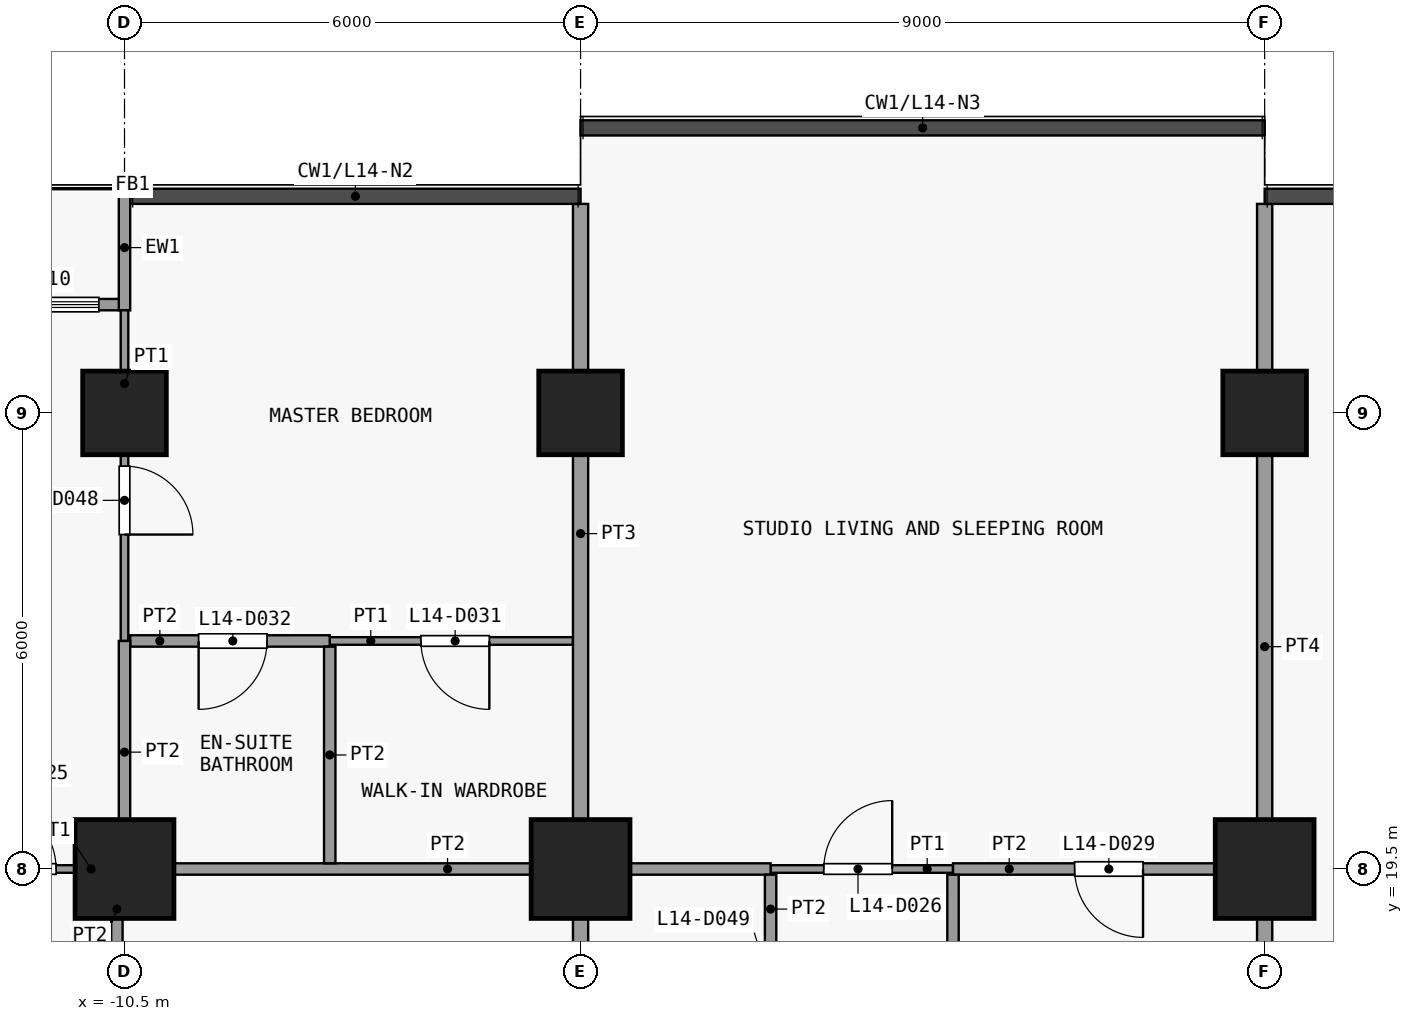
"""IFC4 building model, lengths in metres.
Left out: names, types, materials, properties, quantities, classifications, styles, units other than length and angle.
Written with IfcOpenShell. Run it as: python <this file> out.ifc"""

import sys

from ifc_helpers import new_model, si_unit, direction, frame, frame_2d, origin, origin_2d, place, context, subcontext, project, spatial, rectangle, extrude, element, fill, save


model = new_model("IFC4")
c1 = context("Model", 3, precision=1e-05, world=origin(), true_north=direction((0.0, 1.0)))
c2 = subcontext(c1, "Body", "Model", "MODEL_VIEW")
j1 = project(units=[si_unit("LENGTHUNIT", "METRE"), si_unit("PLANEANGLEUNIT", "RADIAN")], contexts=[c1])
p1 = place(None, origin())
s1 = spatial("IfcSite", under=j1, at=p1, CompositionType="ELEMENT")
p2 = place(p1, origin())
s2 = spatial("IfcBuilding", under=s1, at=p2, CompositionType="ELEMENT")
p3 = place(p2, frame((0.0, 0.0, 61.3)))
s3 = spatial("IfcBuildingStorey", under=s2, at=p3, CompositionType="ELEMENT", Elevation=61.3)
p4 = place(p3, frame((-10.5, 19.5, 0.0), z_axis=(0.0, 0.0, 1.0), x_axis=(1.0, 0.0, 0.0)))
e1 = element("IfcColumn", 1, at=p4, inside=s3, PredefinedType="COLUMN", context=c2, shape_type="SweptSolid", body=[
    extrude(rectangle(XDim=1.3, YDim=1.3, at=origin_2d()), origin(), (0.0, 0.0, 1.0), 3.6),
])
p5 = place(p3, frame((-10.5, 25.5, 0.0), z_axis=(0.0, 0.0, 1.0), x_axis=(1.0, 0.0, 0.0)))
e2 = element("IfcColumn", 2, at=p5, inside=s3, PredefinedType="COLUMN", context=c2, shape_type="SweptSolid", body=[
    extrude(rectangle(XDim=1.1, YDim=1.1, at=origin_2d()), origin(), (0.0, 0.0, 1.0), 3.6),
])
p6 = place(p3, frame((-4.5, 19.5, 0.0), z_axis=(0.0, 0.0, 1.0), x_axis=(1.0, 0.0, 0.0)))
e3 = element("IfcColumn", 3, at=p6, inside=s3, PredefinedType="COLUMN", context=c2, shape_type="SweptSolid", body=[
    extrude(rectangle(XDim=1.3, YDim=1.3, at=origin_2d()), origin(), (0.0, 0.0, 1.0), 3.6),
])
p7 = place(p3, frame((-4.5, 25.5, 0.0), z_axis=(0.0, 0.0, 1.0), x_axis=(1.0, 0.0, 0.0)))
e4 = element("IfcColumn", 4, at=p7, inside=s3, PredefinedType="COLUMN", context=c2, shape_type="SweptSolid", body=[
    extrude(rectangle(XDim=1.1, YDim=1.1, at=origin_2d()), origin(), (0.0, 0.0, 1.0), 3.6),
])
p8 = place(p3, frame((4.5, 19.5, 0.0), z_axis=(0.0, 0.0, 1.0), x_axis=(1.0, 0.0, 0.0)))
e5 = element("IfcColumn", 5, at=p8, inside=s3, PredefinedType="COLUMN", context=c2, shape_type="SweptSolid", body=[
    extrude(rectangle(XDim=1.3, YDim=1.3, at=origin_2d()), origin(), (0.0, 0.0, 1.0), 3.6),
])
p9 = place(p3, frame((4.5, 25.5, 0.0), z_axis=(0.0, 0.0, 1.0), x_axis=(1.0, 0.0, 0.0)))
e6 = element("IfcColumn", 6, at=p9, inside=s3, PredefinedType="COLUMN", context=c2, shape_type="SweptSolid", body=[
    extrude(rectangle(XDim=1.1, YDim=1.1, at=origin_2d()), origin(), (0.0, 0.0, 1.0), 3.6),
])
p10 = place(p3, frame((-10.5, 26.85, 0.0), z_axis=(0.0, 0.0, 1.0), x_axis=(0.0, 1.0, 0.0)))
e7 = element("IfcWall", 7, at=p10, inside=s3, PredefinedType="SOLIDWALL", context=c2, shape_type="SweptSolid", body=[
    extrude(rectangle(XDim=1.65, YDim=0.15, at=frame_2d((0.825, 0.0))), origin(), (0.0, 0.0, 1.0), 3.3),
])
p11 = place(p3, frame((-16.425, 26.925, 0.0), z_axis=(0.0, 0.0, 1.0), x_axis=(1.0, 0.0, 0.0)))
e8 = element("IfcWall", 8, at=p11, inside=s3, PredefinedType="SOLIDWALL", context=c2, shape_type="SweptSolid", body=[
    extrude(rectangle(XDim=5.85, YDim=0.15, at=frame_2d((2.925, 0.0))), origin(), (0.0, 0.0, 1.0), 3.3),
])
p12 = place(p11, frame((2.325, 0.0, 0.0)))
e9 = element("IfcOpeningElement", 9, at=p12, cuts=e8, PredefinedType="OPENING", context=c2, shape_type="SweptSolid", body=[
    extrude(rectangle(XDim=1.2, YDim=2.4, at=frame_2d((0.6, 1.2))), frame((0.0, 0.085, 0.0), z_axis=(0.0, -1.0, 0.0), x_axis=(1.0, 0.0, 0.0)), (0.0, 0.0, 1.0), 0.17),
])
p13 = place(p11, frame((0.262, 0.0, 0.9)))
e10 = element("IfcOpeningElement", 10, at=p13, cuts=e8, PredefinedType="OPENING", context=c2, shape_type="SweptSolid", body=[
    extrude(rectangle(XDim=1.8, YDim=2.1, at=frame_2d((0.9, 1.05))), frame((0.0, 0.085, 0.0), z_axis=(0.0, -1.0, 0.0), x_axis=(1.0, 0.0, 0.0)), (0.0, 0.0, 1.0), 0.17),
])
p14 = place(p11, frame((3.788, 0.0, 0.9)))
e11 = element("IfcOpeningElement", 11, at=p14, cuts=e8, PredefinedType="OPENING", context=c2, shape_type="SweptSolid", body=[
    extrude(rectangle(XDim=1.8, YDim=2.1, at=frame_2d((0.9, 1.05))), frame((0.0, 0.085, 0.0), z_axis=(0.0, -1.0, 0.0), x_axis=(1.0, 0.0, 0.0)), (0.0, 0.0, 1.0), 0.17),
])
p15 = place(p3, frame((-13.0, 19.5, 0.0), z_axis=(0.0, 0.0, 1.0), x_axis=(1.0, 0.0, 0.0)))
e12 = element("IfcWall", 12, at=p15, inside=s3, PredefinedType="PARTITIONING", context=c2, shape_type="SweptSolid", body=[
    extrude(rectangle(XDim=2.4, YDim=0.1, at=frame_2d((1.2, 0.0))), origin(), (0.0, 0.0, 1.0), 3.3),
])
p16 = place(p15, frame((0.7, 0.0, 0.0)))
e13 = element("IfcOpeningElement", 13, at=p16, cuts=e12, PredefinedType="OPENING", context=c2, shape_type="SweptSolid", body=[
    extrude(rectangle(XDim=0.9, YDim=2.1, at=frame_2d((0.45, 1.05))), frame((0.0, 0.06, 0.0), z_axis=(0.0, -1.0, 0.0), x_axis=(1.0, 0.0, 0.0)), (0.0, 0.0, 1.0), 0.12),
])
p17 = place(p3, frame((-2.0, 19.5, 0.0), z_axis=(0.0, 0.0, 1.0), x_axis=(1.0, 0.0, 0.0)))
e14 = element("IfcWall", 14, at=p17, inside=s3, PredefinedType="PARTITIONING", context=c2, shape_type="SweptSolid", body=[
    extrude(rectangle(XDim=2.4, YDim=0.1, at=frame_2d((1.2, 0.0))), origin(), (0.0, 0.0, 1.0), 3.3),
])
p18 = place(p17, frame((0.7, 0.0, 0.0)))
e15 = element("IfcOpeningElement", 15, at=p18, cuts=e14, PredefinedType="OPENING", context=c2, shape_type="SweptSolid", body=[
    extrude(rectangle(XDim=0.9, YDim=2.1, at=frame_2d((0.45, 1.05))), frame((0.0, 0.06, 0.0), z_axis=(0.0, -1.0, 0.0), x_axis=(1.0, 0.0, 0.0)), (0.0, 0.0, 1.0), 0.12),
])
p19 = place(p3, frame((-10.5, 19.5, 0.0), z_axis=(0.0, 0.0, 1.0), x_axis=(1.0, 0.0, 0.0)))
e16 = element("IfcWall", 16, at=p19, inside=s3, PredefinedType="PARTITIONING", context=c2, shape_type="SweptSolid", body=[
    extrude(rectangle(XDim=8.5, YDim=0.15, at=frame_2d((4.25, 0.0))), origin(), (0.0, 0.0, 1.0), 3.3),
])
p20 = place(p3, frame((0.4, 19.5, 0.0), z_axis=(0.0, 0.0, 1.0), x_axis=(1.0, 0.0, 0.0)))
e17 = element("IfcWall", 17, at=p20, inside=s3, PredefinedType="PARTITIONING", context=c2, shape_type="SweptSolid", body=[
    extrude(rectangle(XDim=4.0, YDim=0.15, at=frame_2d((2.0, 0.0))), origin(), (0.0, 0.0, 1.0), 3.3),
])
p21 = place(p20, frame((1.6, 0.0, 0.0)))
e18 = element("IfcOpeningElement", 18, at=p21, cuts=e17, PredefinedType="OPENING", context=c2, shape_type="SweptSolid", body=[
    extrude(rectangle(XDim=0.9, YDim=2.1, at=frame_2d((0.45, 1.05))), frame((0.0, 0.085, 0.0), z_axis=(0.0, -1.0, 0.0), x_axis=(1.0, 0.0, 0.0)), (0.0, 0.0, 1.0), 0.17),
])
p22 = place(p3, frame((-7.8, 22.5, 0.0), z_axis=(0.0, 0.0, 1.0), x_axis=(1.0, 0.0, 0.0)))
e19 = element("IfcWall", 19, at=p22, inside=s3, PredefinedType="PARTITIONING", context=c2, shape_type="SweptSolid", body=[
    extrude(rectangle(XDim=3.2, YDim=0.1, at=frame_2d((1.6, 0.0))), origin(), (0.0, 0.0, 1.0), 3.3),
])
p23 = place(p22, frame((1.2, 0.0, 0.0)))
e20 = element("IfcOpeningElement", 20, at=p23, cuts=e19, PredefinedType="OPENING", context=c2, shape_type="SweptSolid", body=[
    extrude(rectangle(XDim=0.9, YDim=2.1, at=frame_2d((0.45, 1.05))), frame((0.0, 0.06, 0.0), z_axis=(0.0, -1.0, 0.0), x_axis=(1.0, 0.0, 0.0)), (0.0, 0.0, 1.0), 0.12),
])
p24 = place(p3, frame((-10.425, 22.5, 0.0), z_axis=(0.0, 0.0, 1.0), x_axis=(1.0, 0.0, 0.0)))
e21 = element("IfcWall", 21, at=p24, inside=s3, PredefinedType="PARTITIONING", context=c2, shape_type="SweptSolid", body=[
    extrude(rectangle(XDim=2.625, YDim=0.15, at=frame_2d((1.312, 0.0))), origin(), (0.0, 0.0, 1.0), 3.3),
])
p25 = place(p24, frame((0.9, 0.0, 0.0)))
e22 = element("IfcOpeningElement", 22, at=p25, cuts=e21, PredefinedType="OPENING", context=c2, shape_type="SweptSolid", body=[
    extrude(rectangle(XDim=0.9, YDim=2.1, at=frame_2d((0.45, 1.05))), frame((0.0, 0.085, 0.0), z_axis=(0.0, -1.0, 0.0), x_axis=(1.0, 0.0, 0.0)), (0.0, 0.0, 1.0), 0.17),
])
p26 = place(p3, frame((-10.6, 16.6, 0.0), z_axis=(0.0, 0.0, 1.0), x_axis=(0.0, 1.0, 0.0)))
e23 = element("IfcWall", 23, at=p26, inside=s3, PredefinedType="PARTITIONING", context=c2, shape_type="SweptSolid", body=[
    extrude(rectangle(XDim=2.825, YDim=0.15, at=frame_2d((1.413, 0.0))), origin(), (0.0, 0.0, 1.0), 3.3),
])
p27 = place(p26, frame((0.9, 0.0, 0.0)))
e24 = element("IfcOpeningElement", 24, at=p27, cuts=e23, PredefinedType="OPENING", context=c2, shape_type="SweptSolid", body=[
    extrude(rectangle(XDim=0.9, YDim=2.1, at=frame_2d((0.45, 1.05))), frame((0.0, 0.085, 0.0), z_axis=(0.0, -1.0, 0.0), x_axis=(1.0, 0.0, 0.0)), (0.0, 0.0, 1.0), 0.17),
])
p28 = place(p3, frame((-10.5, 22.5, 0.0), z_axis=(0.0, 0.0, 1.0), x_axis=(0.0, 1.0, 0.0)))
e25 = element("IfcWall", 25, at=p28, inside=s3, PredefinedType="PARTITIONING", context=c2, shape_type="SweptSolid", body=[
    extrude(rectangle(XDim=4.35, YDim=0.1, at=frame_2d((2.175, 0.0))), origin(), (0.0, 0.0, 1.0), 3.3),
])
p29 = place(p28, frame((1.4, 0.0, 0.0)))
e26 = element("IfcOpeningElement", 26, at=p29, cuts=e25, PredefinedType="OPENING", context=c2, shape_type="SweptSolid", body=[
    extrude(rectangle(XDim=0.9, YDim=2.1, at=frame_2d((0.45, 1.05))), frame((0.0, 0.06, 0.0), z_axis=(0.0, -1.0, 0.0), x_axis=(1.0, 0.0, 0.0)), (0.0, 0.0, 1.0), 0.12),
])
p30 = place(p3, frame((-10.5, 19.575, 0.0), z_axis=(0.0, 0.0, 1.0), x_axis=(0.0, 1.0, 0.0)))
e27 = element("IfcWall", 27, at=p30, inside=s3, PredefinedType="PARTITIONING", context=c2, shape_type="SweptSolid", body=[
    extrude(rectangle(XDim=2.925, YDim=0.15, at=frame_2d((1.462, 0.0))), origin(), (0.0, 0.0, 1.0), 3.3),
])
p31 = place(p3, frame((-7.8, 19.575, 0.0), z_axis=(0.0, 0.0, 1.0), x_axis=(0.0, 1.0, 0.0)))
e28 = element("IfcWall", 28, at=p31, inside=s3, PredefinedType="PARTITIONING", context=c2, shape_type="SweptSolid", body=[
    extrude(rectangle(XDim=2.85, YDim=0.15, at=frame_2d((1.425, 0.0))), origin(), (0.0, 0.0, 1.0), 3.3),
])
p32 = place(p3, frame((-4.5, 16.6, 0.0), z_axis=(0.0, 0.0, 1.0), x_axis=(0.0, 1.0, 0.0)))
e29 = element("IfcWall", 29, at=p32, inside=s3, PredefinedType="PARTITIONING", context=c2, shape_type="SweptSolid", body=[
    extrude(rectangle(XDim=2.825, YDim=0.2, at=frame_2d((1.413, 0.0))), origin(), (0.0, 0.0, 1.0), 3.3),
])
p33 = place(p3, frame((-4.5, 19.575, 0.0), z_axis=(0.0, 0.0, 1.0), x_axis=(0.0, 1.0, 0.0)))
e30 = element("IfcWall", 30, at=p33, inside=s3, PredefinedType="PARTITIONING", context=c2, shape_type="SweptSolid", body=[
    extrude(rectangle(XDim=8.675, YDim=0.2, at=frame_2d((4.337, 0.0))), origin(), (0.0, 0.0, 1.0), 3.3),
])
p34 = place(p3, frame((-2.0, 16.6, 0.0), z_axis=(0.0, 0.0, 1.0), x_axis=(0.0, 1.0, 0.0)))
e31 = element("IfcWall", 31, at=p34, inside=s3, PredefinedType="PARTITIONING", context=c2, shape_type="SweptSolid", body=[
    extrude(rectangle(XDim=2.825, YDim=0.15, at=frame_2d((1.413, 0.0))), origin(), (0.0, 0.0, 1.0), 3.3),
])
p35 = place(p34, frame((0.9, 0.0, 0.0)))
e32 = element("IfcOpeningElement", 32, at=p35, cuts=e31, PredefinedType="OPENING", context=c2, shape_type="SweptSolid", body=[
    extrude(rectangle(XDim=0.9, YDim=2.1, at=frame_2d((0.45, 1.05))), frame((0.0, 0.085, 0.0), z_axis=(0.0, -1.0, 0.0), x_axis=(1.0, 0.0, 0.0)), (0.0, 0.0, 1.0), 0.17),
])
p36 = place(p3, frame((0.4, 16.6, 0.0), z_axis=(0.0, 0.0, 1.0), x_axis=(0.0, 1.0, 0.0)))
e33 = element("IfcWall", 33, at=p36, inside=s3, PredefinedType="PARTITIONING", context=c2, shape_type="SweptSolid", body=[
    extrude(rectangle(XDim=2.825, YDim=0.15, at=frame_2d((1.413, 0.0))), origin(), (0.0, 0.0, 1.0), 3.3),
])
p37 = place(p3, frame((4.5, 16.6, 0.0), z_axis=(0.0, 0.0, 1.0), x_axis=(0.0, 1.0, 0.0)))
e34 = element("IfcWall", 34, at=p37, inside=s3, PredefinedType="PARTITIONING", context=c2, shape_type="SweptSolid", body=[
    extrude(rectangle(XDim=11.65, YDim=0.2, at=frame_2d((5.825, 0.0))), origin(), (0.0, 0.0, 1.0), 3.3),
])
p38 = place(p14, origin())
e35 = element("IfcWindow", 35, at=p38, inside=s3, PartitioningType="SINGLE_PANEL", PredefinedType="WINDOW", context=c2, shape_type="SweptSolid", body=[
    extrude(rectangle(XDim=1.8, YDim=2.1, at=frame_2d((0.9, 1.05))), frame((0.0, 0.03, 0.0), z_axis=(0.0, -1.0, 0.0), x_axis=(1.0, 0.0, 0.0)), (0.0, 0.0, 1.0), 0.06),
])
fill(e11, e35)
p39 = place(p16, origin())
e36 = element("IfcDoor", 36, at=p39, inside=s3, OperationType="SINGLE_SWING_RIGHT", PredefinedType="DOOR", context=c2, shape_type="SweptSolid", body=[
    extrude(rectangle(XDim=0.9, YDim=2.1, at=frame_2d((0.45, 1.05))), frame((0.0, 0.025, 0.0), z_axis=(0.0, -1.0, 0.0), x_axis=(1.0, 0.0, 0.0)), (0.0, 0.0, 1.0), 0.05),
])
fill(e13, e36)
p40 = place(p18, origin())
e37 = element("IfcDoor", 37, at=p40, inside=s3, OperationType="SINGLE_SWING_LEFT", PredefinedType="DOOR", context=c2, shape_type="SweptSolid", body=[
    extrude(rectangle(XDim=0.9, YDim=2.1, at=frame_2d((0.45, 1.05))), frame((0.0, 0.025, 0.0), z_axis=(0.0, -1.0, 0.0), x_axis=(1.0, 0.0, 0.0)), (0.0, 0.0, 1.0), 0.05),
])
fill(e15, e37)
p41 = place(p21, origin())
e38 = element("IfcDoor", 38, at=p41, inside=s3, OperationType="SINGLE_SWING_RIGHT", PredefinedType="DOOR", context=c2, shape_type="SweptSolid", body=[
    extrude(rectangle(XDim=0.9, YDim=2.1, at=frame_2d((0.45, 1.05))), frame((0.0, 0.025, 0.0), z_axis=(0.0, -1.0, 0.0), x_axis=(1.0, 0.0, 0.0)), (0.0, 0.0, 1.0), 0.05),
])
fill(e18, e38)
p42 = place(p23, origin())
e39 = element("IfcDoor", 39, at=p42, inside=s3, OperationType="SINGLE_SWING_RIGHT", PredefinedType="DOOR", context=c2, shape_type="SweptSolid", body=[
    extrude(rectangle(XDim=0.9, YDim=2.1, at=frame_2d((0.45, 1.05))), frame((0.0, 0.025, 0.0), z_axis=(0.0, -1.0, 0.0), x_axis=(1.0, 0.0, 0.0)), (0.0, 0.0, 1.0), 0.05),
])
fill(e20, e39)
p43 = place(p25, origin())
e40 = element("IfcDoor", 40, at=p43, inside=s3, OperationType="SINGLE_SWING_LEFT", PredefinedType="DOOR", context=c2, shape_type="SweptSolid", body=[
    extrude(rectangle(XDim=0.9, YDim=2.1, at=frame_2d((0.45, 1.05))), frame((0.0, 0.025, 0.0), z_axis=(0.0, -1.0, 0.0), x_axis=(1.0, 0.0, 0.0)), (0.0, 0.0, 1.0), 0.05),
])
fill(e22, e40)
p44 = place(p29, origin())
e41 = element("IfcDoor", 41, at=p44, inside=s3, OperationType="SINGLE_SWING_LEFT", PredefinedType="DOOR", context=c2, shape_type="SweptSolid", body=[
    extrude(rectangle(XDim=0.9, YDim=2.1, at=frame_2d((0.45, 1.05))), frame((0.0, 0.025, 0.0), z_axis=(0.0, -1.0, 0.0), x_axis=(1.0, 0.0, 0.0)), (0.0, 0.0, 1.0), 0.05),
])
fill(e26, e41)
save(model, sys.argv[1])
